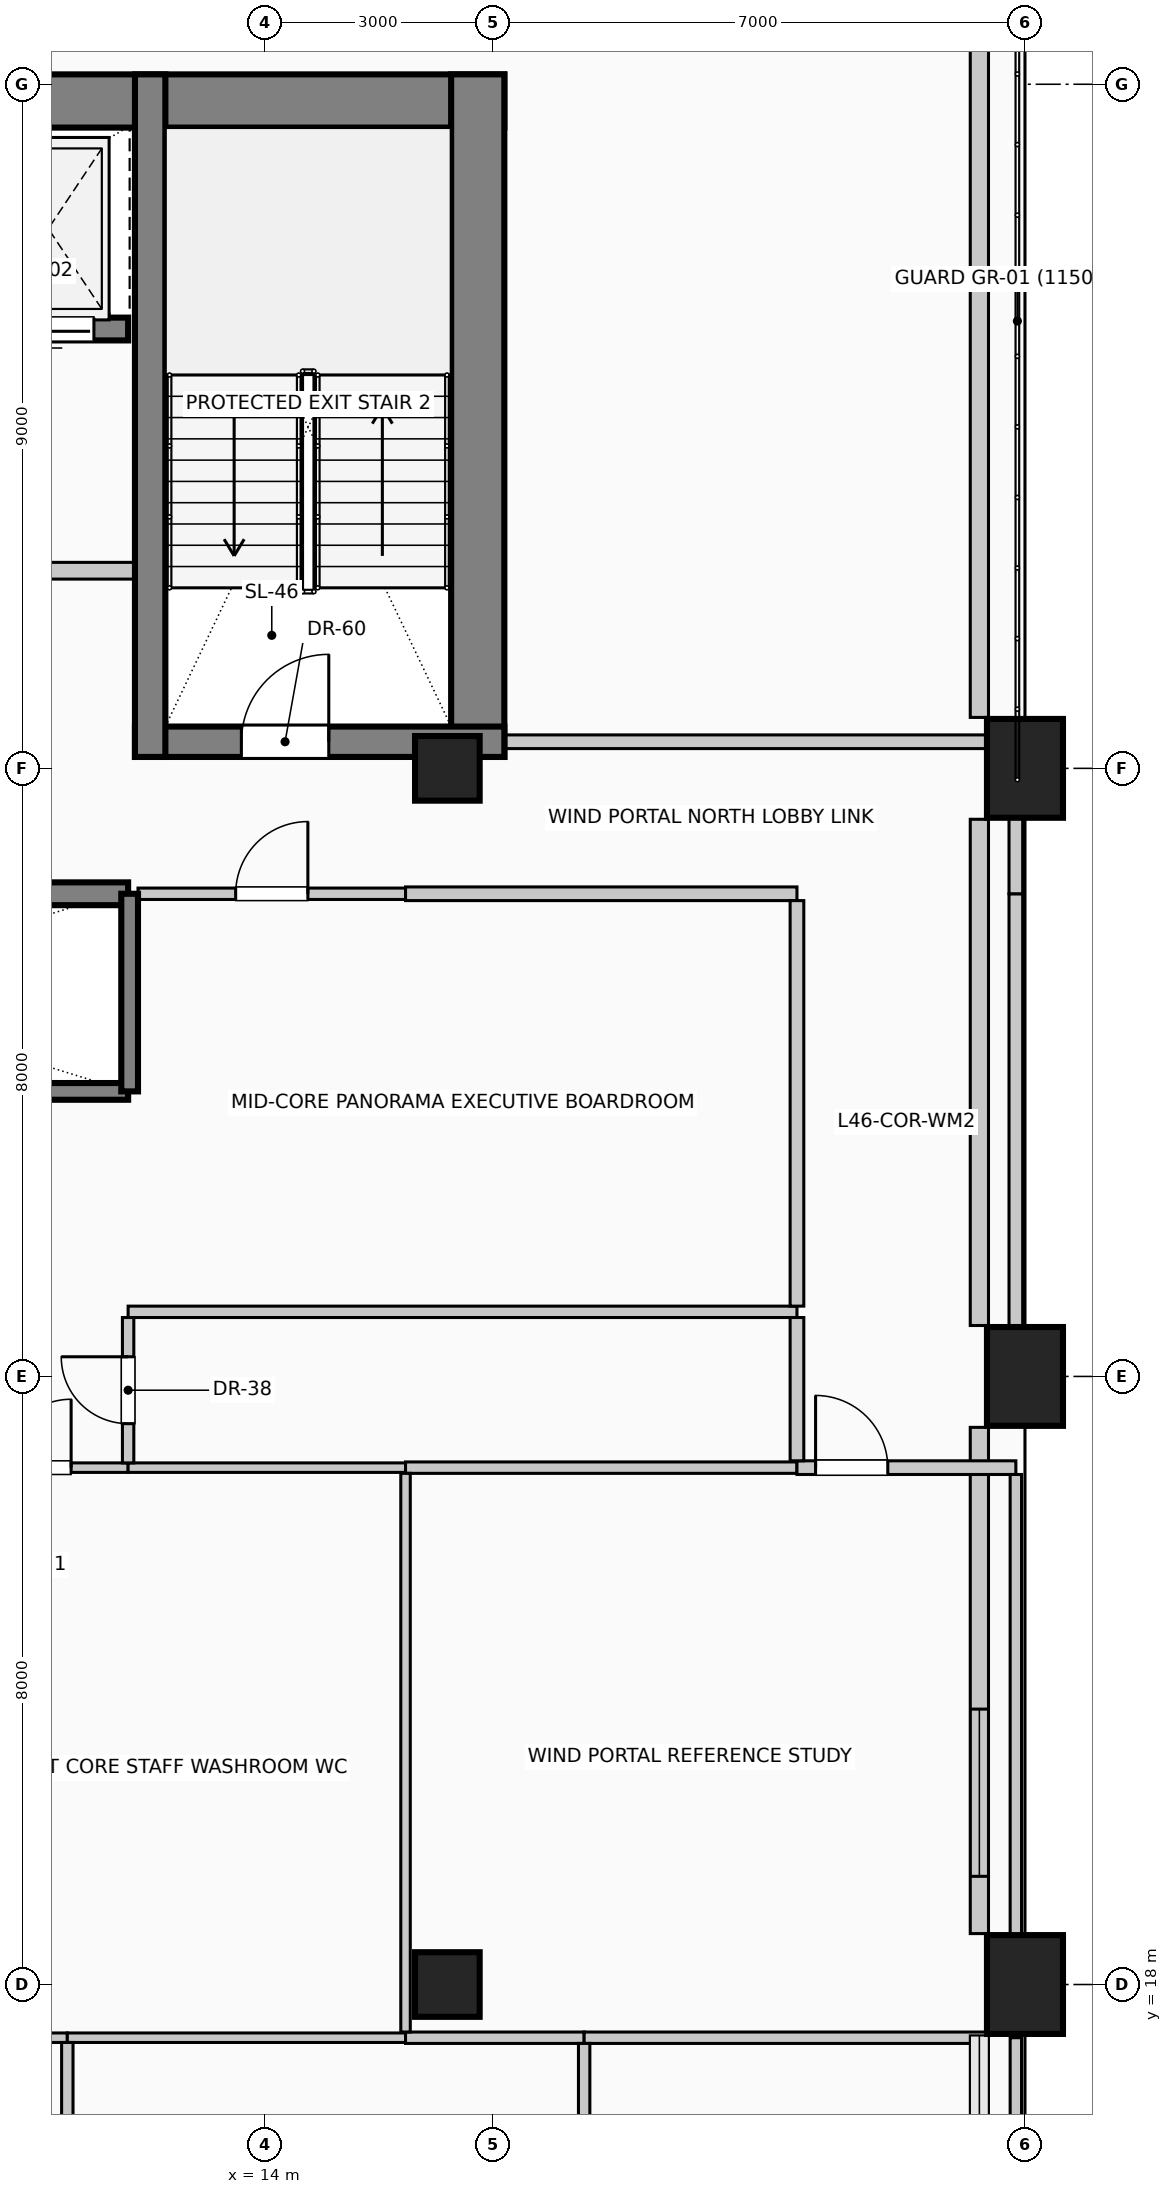
"""IFC4 building model, lengths in metres.
Left out: names, types, materials, properties, quantities, classifications, styles, units other than length and angle.
Written with IfcOpenShell. Run it as: python <this file> out.ifc"""

import sys

from ifc_helpers import new_model, si_unit, direction, frame, frame_2d, origin, origin_2d, place, context, subcontext, project, spatial, rectangle, circle, extrude, element, fill, save


model = new_model("IFC4")
c1 = context("Model", 3, precision=1e-05, world=origin(), true_north=direction((0.0, 1.0)))
c2 = subcontext(c1, "Body", "Model", "MODEL_VIEW")
j1 = project(units=[si_unit("LENGTHUNIT", "METRE"), si_unit("PLANEANGLEUNIT", "RADIAN")], contexts=[c1])
p1 = place(None, origin())
s1 = spatial("IfcSite", under=j1, at=p1, CompositionType="ELEMENT")
p2 = place(p1, origin())
s2 = spatial("IfcBuilding", under=s1, at=p2, CompositionType="ELEMENT")
p3 = place(p2, frame((0.0, 0.0, 190.6)))
s3 = spatial("IfcBuildingStorey", under=s2, at=p3, CompositionType="ELEMENT", Elevation=190.6)
p4 = place(p3, frame((2.85, 42.78, 0.0), z_axis=(0.0, 0.0, 1.0), x_axis=(1.0, 0.0, 0.0)))
e1 = element("IfcWall", 1, at=p4, inside=s3, PredefinedType="SHEAR", context=c2, shape_type="SweptSolid", body=[
    extrude(rectangle(XDim=14.3, YDim=0.7, at=frame_2d((7.15, 0.0))), origin(), (0.0, 0.0, 1.0), 4.0),
])
p5 = place(p3, frame((16.8, 34.15, 0.0), z_axis=(0.0, 0.0, 1.0), x_axis=(0.0, 1.0, 0.0)))
e2 = element("IfcWall", 2, at=p5, inside=s3, PredefinedType="SHEAR", context=c2, shape_type="SweptSolid", body=[
    extrude(rectangle(XDim=8.98, YDim=0.7, at=frame_2d((4.49, 0.0))), origin(), (0.0, 0.0, 1.0), 4.0),
])
p6 = place(p3, frame((12.29, 34.35, 0.0), z_axis=(0.0, 0.0, 1.0), x_axis=(1.0, 0.0, 0.0)))
e3 = element("IfcWall", 3, at=p6, inside=s3, PredefinedType="SHEAR", context=c2, shape_type="SweptSolid", body=[
    extrude(rectangle(XDim=4.86, YDim=0.4, at=frame_2d((2.43, 0.0))), origin(), (0.0, 0.0, 1.0), 4.0),
])
p7 = place(p6, frame((1.4, 0.0, 0.0)))
e4 = element("IfcOpeningElement", 4, at=p7, cuts=e3, PredefinedType="OPENING", context=c2, shape_type="SweptSolid", body=[
    extrude(rectangle(XDim=1.15, YDim=2.2, at=frame_2d((0.575, 1.1))), frame((0.0, 0.21, 0.0), z_axis=(0.0, -1.0, 0.0), x_axis=(1.0, 0.0, 0.0)), (0.0, 0.0, 1.0), 0.42),
])
p8 = place(p3, frame((12.49, 34.15, 0.0), z_axis=(0.0, 0.0, 1.0), x_axis=(0.0, 1.0, 0.0)))
e5 = element("IfcWall", 5, at=p8, inside=s3, PredefinedType="SHEAR", context=c2, shape_type="SweptSolid", body=[
    extrude(rectangle(XDim=8.98, YDim=0.4, at=frame_2d((4.49, 0.0))), origin(), (0.0, 0.0, 1.0), 4.0),
])
for number, where, z_axis, x_axis in (
    (6, (24.0, 18.0, 0.0), (0.0, 0.0, 1.0), (1.0, 0.0, 0.0)),
    (7, (24.0, 26.0, 0.0), (0.0, 0.0, 1.0), (1.0, 0.0, 0.0)),
    (8, (24.0, 34.0, 0.0), (0.0, 0.0, 1.0), (1.0, 0.0, 0.0)),
):
    element("IfcColumn", number, at=place(p3, frame(where, z_axis=z_axis, x_axis=x_axis)), inside=s3, PredefinedType="COLUMN", context=c2, shape_type="SweptSolid", body=[
        extrude(rectangle(XDim=1.0, YDim=1.3, at=origin_2d()), origin(), (0.0, 0.0, 1.0), 4.0),
    ])
for number, where, z_axis, x_axis in (
    (9, (16.4, 18.0, 0.0), (0.0, 0.0, 1.0), (1.0, 0.0, 0.0)),
    (10, (16.4, 34.0, 0.0), (0.0, 0.0, 1.0), (1.0, 0.0, 0.0)),
):
    element("IfcColumn", number, at=place(p3, frame(where, z_axis=z_axis, x_axis=x_axis)), inside=s3, PredefinedType="COLUMN", context=c2, shape_type="SweptSolid", body=[
        extrude(circle(Radius=0.425, at=origin_2d()), origin(), (0.0, 0.0, 1.0), 4.0),
    ])
p9 = place(p3, frame((23.4, 25.33, 0.0), z_axis=(0.0, 0.0, 1.0), x_axis=(0.0, -1.0, 0.0)))
e11 = element("IfcWall", 11, at=p9, inside=s3, PredefinedType="SOLIDWALL", context=c2, shape_type="SweptSolid", body=[
    extrude(rectangle(XDim=6.66, YDim=0.24, at=frame_2d((3.33, 0.0))), origin(), (0.0, 0.0, 1.0), 3.75),
])
p10 = place(p9, frame((3.707, 0.0, 0.42)))
e12 = element("IfcOpeningElement", 12, at=p10, cuts=e11, PredefinedType="OPENING", context=c2, shape_type="SweptSolid", body=[
    extrude(rectangle(XDim=2.2, YDim=1.95, at=frame_2d((1.1, 0.975))), frame((0.0, 0.13, 0.0), z_axis=(0.0, -1.0, 0.0), x_axis=(1.0, 0.0, 0.0)), (0.0, 0.0, 1.0), 0.26),
])
p11 = place(p3, frame((23.4, 33.33, 0.0), z_axis=(0.0, 0.0, 1.0), x_axis=(0.0, -1.0, 0.0)))
e13 = element("IfcWall", 13, at=p11, inside=s3, PredefinedType="SOLIDWALL", context=c2, shape_type="SweptSolid", body=[
    extrude(rectangle(XDim=6.66, YDim=0.24, at=frame_2d((3.33, 0.0))), origin(), (0.0, 0.0, 1.0), 3.75),
])
p12 = place(p3, frame((23.4, 44.73, 0.0), z_axis=(0.0, 0.0, 1.0), x_axis=(0.0, -1.0, 0.0)))
e14 = element("IfcWall", 14, at=p12, inside=s3, PredefinedType="SOLIDWALL", context=c2, shape_type="SweptSolid", body=[
    extrude(rectangle(XDim=10.06, YDim=0.24, at=frame_2d((5.03, 0.0))), origin(), (0.0, 0.0, 1.0), 3.75),
])
p13 = place(p3, frame((10.05, 32.35, 0.0), z_axis=(0.0, 0.0, 1.0), x_axis=(1.0, 0.0, 0.0)))
e15 = element("IfcWall", 15, at=p13, inside=s3, PredefinedType="SOLIDWALL", context=c2, shape_type="SweptSolid", body=[
    extrude(rectangle(XDim=2.15, YDim=0.3, at=frame_2d((1.075, 0.0))), origin(), (0.0, 0.0, 1.0), 4.0),
])
p14 = place(p3, frame((12.2, 39.78, 0.0), z_axis=(0.0, 0.0, 1.0), x_axis=(-1.0, 0.0, 0.0)))
e16 = element("IfcWall", 16, at=p14, inside=s3, PredefinedType="SOLIDWALL", context=c2, shape_type="SweptSolid", body=[
    extrude(rectangle(XDim=2.2, YDim=0.3, at=frame_2d((1.1, 0.0))), origin(), (0.0, 0.0, 1.0), 4.0),
])
p15 = place(p14, frame((0.45, 0.0, 0.0)))
e17 = element("IfcOpeningElement", 17, at=p15, cuts=e16, PredefinedType="OPENING", context=c2, shape_type="SweptSolid", body=[
    extrude(rectangle(XDim=1.3, YDim=2.25, at=frame_2d((0.65, 1.125))), frame((0.0, 0.16, 0.0), z_axis=(0.0, -1.0, 0.0), x_axis=(1.0, 0.0, 0.0)), (0.0, 0.0, 1.0), 0.32),
])
p16 = place(p3, frame((3.55, 29.75, 0.0), z_axis=(0.0, 0.0, 1.0), x_axis=(1.0, 0.0, 0.0)))
e18 = element("IfcWall", 18, at=p16, inside=s3, PredefinedType="SOLIDWALL", context=c2, shape_type="SweptSolid", body=[
    extrude(rectangle(XDim=8.65, YDim=0.22, at=frame_2d((4.325, 0.0))), origin(), (0.0, 0.0, 1.0), 4.0),
])
p17 = place(p3, frame((12.22, 29.75, 0.0), z_axis=(0.0, 0.0, 1.0), x_axis=(0.0, 1.0, 0.0)))
e19 = element("IfcWall", 19, at=p17, inside=s3, PredefinedType="SOLIDWALL", context=c2, shape_type="SweptSolid", body=[
    extrude(rectangle(XDim=2.6, YDim=0.22, at=frame_2d((1.3, 0.0))), origin(), (0.0, 0.0, 1.0), 4.0),
])
p18 = place(p3, frame((7.51, 36.6, 0.0), z_axis=(0.0, 0.0, 1.0), x_axis=(1.0, 0.0, 0.0)))
e20 = element("IfcWall", 20, at=p18, inside=s3, PredefinedType="PARTITIONING", context=c2, shape_type="SweptSolid", body=[
    extrude(rectangle(XDim=4.98, YDim=0.22, at=frame_2d((2.49, 0.0))), origin(), (0.0, 0.0, 1.0), 3.75),
])
p19 = place(p18, frame((1.94, 0.0, 0.0)))
e21 = element("IfcOpeningElement", 21, at=p19, cuts=e20, PredefinedType="OPENING", context=c2, shape_type="SweptSolid", body=[
    extrude(rectangle(XDim=1.1, YDim=2.2, at=frame_2d((0.55, 1.1))), frame((0.0, 0.12, 0.0), z_axis=(0.0, -1.0, 0.0), x_axis=(1.0, 0.0, 0.0)), (0.0, 0.0, 1.0), 0.24),
])
p20 = place(p3, frame((9.8, 17.3, 0.0), z_axis=(0.0, 0.0, 1.0), x_axis=(1.0, 0.0, 0.0)))
e22 = element("IfcWall", 22, at=p20, inside=s3, PredefinedType="PARTITIONING", context=c2, shape_type="SweptSolid", body=[
    extrude(rectangle(XDim=1.6, YDim=0.125, at=frame_2d((0.8, 0.0))), origin(), (0.0, 0.0, 1.0), 3.75),
])
p21 = place(p3, frame((11.4, 17.3, 0.0), z_axis=(0.0, 0.0, 1.0), x_axis=(1.0, 0.0, 0.0)))
e23 = element("IfcWall", 23, at=p21, inside=s3, PredefinedType="PARTITIONING", context=c2, shape_type="SweptSolid", body=[
    extrude(rectangle(XDim=4.45, YDim=0.125, at=frame_2d((2.225, 0.0))), origin(), (0.0, 0.0, 1.0), 3.75),
])
p22 = place(p3, frame((15.85, 17.3, 0.0), z_axis=(0.0, 0.0, 1.0), x_axis=(1.0, 0.0, 0.0)))
e24 = element("IfcWall", 24, at=p22, inside=s3, PredefinedType="PARTITIONING", context=c2, shape_type="SweptSolid", body=[
    extrude(rectangle(XDim=2.35, YDim=0.15, at=frame_2d((1.175, 0.0))), origin(), (0.0, 0.0, 1.0), 3.75),
])
p23 = place(p3, frame((18.2, 17.3, 0.0), z_axis=(0.0, 0.0, 1.0), x_axis=(1.0, 0.0, 0.0)))
e25 = element("IfcWall", 25, at=p23, inside=s3, PredefinedType="PARTITIONING", context=c2, shape_type="SweptSolid", body=[
    extrude(rectangle(XDim=5.3, YDim=0.15, at=frame_2d((2.65, 0.0))), origin(), (0.0, 0.0, 1.0), 3.75),
])
p24 = place(p3, frame((9.8, 24.8, 0.0), z_axis=(0.0, 0.0, 1.0), x_axis=(1.0, 0.0, 0.0)))
e26 = element("IfcWall", 26, at=p24, inside=s3, PredefinedType="PARTITIONING", context=c2, shape_type="SweptSolid", body=[
    extrude(rectangle(XDim=2.4, YDim=0.125, at=frame_2d((1.2, 0.0))), origin(), (0.0, 0.0, 1.0), 3.75),
])
p25 = place(p24, frame((0.75, 0.0, 0.0)))
e27 = element("IfcOpeningElement", 27, at=p25, cuts=e26, PredefinedType="OPENING", context=c2, shape_type="SweptSolid", body=[
    extrude(rectangle(XDim=0.9, YDim=2.1, at=frame_2d((0.45, 1.05))), frame((0.0, 0.073, 0.0), z_axis=(0.0, -1.0, 0.0), x_axis=(1.0, 0.0, 0.0)), (0.0, 0.0, 1.0), 0.145),
])
p26 = place(p3, frame((12.2, 24.8, 0.0), z_axis=(0.0, 0.0, 1.0), x_axis=(1.0, 0.0, 0.0)))
e28 = element("IfcWall", 28, at=p26, inside=s3, PredefinedType="PARTITIONING", context=c2, shape_type="SweptSolid", body=[
    extrude(rectangle(XDim=3.65, YDim=0.125, at=frame_2d((1.825, 0.0))), origin(), (0.0, 0.0, 1.0), 3.75),
])
p27 = place(p3, frame((15.85, 24.8, 0.0), z_axis=(0.0, 0.0, 1.0), x_axis=(1.0, 0.0, 0.0)))
e29 = element("IfcWall", 29, at=p27, inside=s3, PredefinedType="PARTITIONING", context=c2, shape_type="SweptSolid", body=[
    extrude(rectangle(XDim=5.15, YDim=0.15, at=frame_2d((2.575, 0.0))), origin(), (0.0, 0.0, 1.0), 3.75),
])
p28 = place(p3, frame((21.0, 24.8, 0.0), z_axis=(0.0, 0.0, 1.0), x_axis=(1.0, 0.0, 0.0)))
e30 = element("IfcWall", 30, at=p28, inside=s3, PredefinedType="PARTITIONING", context=c2, shape_type="SweptSolid", body=[
    extrude(rectangle(XDim=2.88, YDim=0.18, at=frame_2d((1.44, 0.0))), origin(), (0.0, 0.0, 1.0), 3.75),
])
p29 = place(p28, frame((0.245, 0.0, 0.0)))
e31 = element("IfcOpeningElement", 31, at=p29, cuts=e30, PredefinedType="OPENING", context=c2, shape_type="SweptSolid", body=[
    extrude(rectangle(XDim=0.95, YDim=2.15, at=frame_2d((0.475, 1.075))), frame((0.0, 0.1, 0.0), z_axis=(0.0, -1.0, 0.0), x_axis=(1.0, 0.0, 0.0)), (0.0, 0.0, 1.0), 0.2),
])
p30 = place(p3, frame((12.2, 26.85, 0.0), z_axis=(0.0, 0.0, 1.0), x_axis=(1.0, 0.0, 0.0)))
e32 = element("IfcWall", 32, at=p30, inside=s3, PredefinedType="PARTITIONING", context=c2, shape_type="SweptSolid", body=[
    extrude(rectangle(XDim=8.8, YDim=0.15, at=frame_2d((4.4, 0.0))), origin(), (0.0, 0.0, 1.0), 3.75),
])
p31 = place(p3, frame((12.33, 32.35, 0.0), z_axis=(0.0, 0.0, 1.0), x_axis=(1.0, 0.0, 0.0)))
e33 = element("IfcWall", 33, at=p31, inside=s3, PredefinedType="PARTITIONING", context=c2, shape_type="SweptSolid", body=[
    extrude(rectangle(XDim=3.52, YDim=0.15, at=frame_2d((1.76, 0.0))), origin(), (0.0, 0.0, 1.0), 3.75),
])
p32 = place(p31, frame((1.285, 0.0, 0.0)))
e34 = element("IfcOpeningElement", 34, at=p32, cuts=e33, PredefinedType="OPENING", context=c2, shape_type="SweptSolid", body=[
    extrude(rectangle(XDim=0.95, YDim=2.15, at=frame_2d((0.475, 1.075))), frame((0.0, 0.085, 0.0), z_axis=(0.0, -1.0, 0.0), x_axis=(1.0, 0.0, 0.0)), (0.0, 0.0, 1.0), 0.17),
])
p33 = place(p3, frame((15.85, 32.35, 0.0), z_axis=(0.0, 0.0, 1.0), x_axis=(1.0, 0.0, 0.0)))
e35 = element("IfcWall", 35, at=p33, inside=s3, PredefinedType="PARTITIONING", context=c2, shape_type="SweptSolid", body=[
    extrude(rectangle(XDim=5.15, YDim=0.18, at=frame_2d((2.575, 0.0))), origin(), (0.0, 0.0, 1.0), 3.75),
])
p34 = place(p3, frame((17.15, 34.35, 0.0), z_axis=(0.0, 0.0, 1.0), x_axis=(1.0, 0.0, 0.0)))
e36 = element("IfcWall", 36, at=p34, inside=s3, PredefinedType="PARTITIONING", context=c2, shape_type="SweptSolid", body=[
    extrude(rectangle(XDim=6.35, YDim=0.18, at=frame_2d((3.175, 0.0))), origin(), (0.0, 0.0, 1.0), 3.75),
])
p35 = place(p3, frame((11.4, 10.39, 0.0), z_axis=(0.0, 0.0, 1.0), x_axis=(0.0, 1.0, 0.0)))
e37 = element("IfcWall", 37, at=p35, inside=s3, PredefinedType="PARTITIONING", context=c2, shape_type="SweptSolid", body=[
    extrude(rectangle(XDim=6.848, YDim=0.15, at=frame_2d((3.424, 0.0))), origin(), (0.0, 0.0, 1.0), 3.75),
])
p36 = place(p3, frame((12.2, 24.863, 0.0), z_axis=(0.0, 0.0, 1.0), x_axis=(0.0, 1.0, 0.0)))
e38 = element("IfcWall", 38, at=p36, inside=s3, PredefinedType="PARTITIONING", context=c2, shape_type="SweptSolid", body=[
    extrude(rectangle(XDim=1.912, YDim=0.15, at=frame_2d((0.956, 0.0))), origin(), (0.0, 0.0, 1.0), 3.75),
])
p37 = place(p36, frame((0.516, 0.0, 0.0)))
e39 = element("IfcOpeningElement", 39, at=p37, cuts=e38, PredefinedType="OPENING", context=c2, shape_type="SweptSolid", body=[
    extrude(rectangle(XDim=0.88, YDim=2.1, at=frame_2d((0.44, 1.05))), frame((0.0, 0.085, 0.0), z_axis=(0.0, -1.0, 0.0), x_axis=(1.0, 0.0, 0.0)), (0.0, 0.0, 1.0), 0.17),
])
p38 = place(p3, frame((15.85, 17.375, 0.0), z_axis=(0.0, 0.0, 1.0), x_axis=(0.0, 1.0, 0.0)))
e40 = element("IfcWall", 40, at=p38, inside=s3, PredefinedType="PARTITIONING", context=c2, shape_type="SweptSolid", body=[
    extrude(rectangle(XDim=7.35, YDim=0.125, at=frame_2d((3.675, 0.0))), origin(), (0.0, 0.0, 1.0), 3.75),
])
p39 = place(p3, frame((18.2, 10.39, 0.0), z_axis=(0.0, 0.0, 1.0), x_axis=(0.0, 1.0, 0.0)))
e41 = element("IfcWall", 41, at=p39, inside=s3, PredefinedType="PARTITIONING", context=c2, shape_type="SweptSolid", body=[
    extrude(rectangle(XDim=6.835, YDim=0.15, at=frame_2d((3.417, 0.0))), origin(), (0.0, 0.0, 1.0), 3.75),
])
p40 = place(p3, frame((21.0, 24.89, 0.0), z_axis=(0.0, 0.0, 1.0), x_axis=(0.0, 1.0, 0.0)))
e42 = element("IfcWall", 42, at=p40, inside=s3, PredefinedType="PARTITIONING", context=c2, shape_type="SweptSolid", body=[
    extrude(rectangle(XDim=1.885, YDim=0.18, at=frame_2d((0.942, 0.0))), origin(), (0.0, 0.0, 1.0), 3.75),
])
p41 = place(p3, frame((21.0, 26.925, 0.0), z_axis=(0.0, 0.0, 1.0), x_axis=(0.0, 1.0, 0.0)))
e43 = element("IfcWall", 43, at=p41, inside=s3, PredefinedType="PARTITIONING", context=c2, shape_type="SweptSolid", body=[
    extrude(rectangle(XDim=5.335, YDim=0.18, at=frame_2d((2.667, 0.0))), origin(), (0.0, 0.0, 1.0), 3.75),
])
p42 = place(p3, frame((23.88, 10.65, 0.0), z_axis=(0.0, 0.0, 1.0), x_axis=(0.0, 1.0, 0.0)))
e44 = element("IfcWall", 44, at=p42, inside=s3, PredefinedType="PARTITIONING", context=c2, shape_type="SweptSolid", body=[
    extrude(rectangle(XDim=6.65, YDim=0.15, at=frame_2d((3.325, 0.0))), origin(), (0.0, 0.0, 1.0), 3.145),
])
p43 = place(p3, frame((23.88, 18.65, 0.0), z_axis=(0.0, 0.0, 1.0), x_axis=(0.0, 1.0, 0.0)))
e45 = element("IfcWall", 45, at=p43, inside=s3, PredefinedType="PARTITIONING", context=c2, shape_type="SweptSolid", body=[
    extrude(rectangle(XDim=6.06, YDim=0.15, at=frame_2d((3.03, 0.0))), origin(), (0.0, 0.0, 1.0), 3.145),
])
p44 = place(p3, frame((23.88, 26.65, 0.0), z_axis=(0.0, 0.0, 1.0), x_axis=(0.0, 1.0, 0.0)))
e46 = element("IfcWall", 46, at=p44, inside=s3, PredefinedType="PARTITIONING", context=c2, shape_type="SweptSolid", body=[
    extrude(rectangle(XDim=5.7, YDim=0.18, at=frame_2d((2.85, 0.0))), origin(), (0.0, 0.0, 1.0), 3.145),
])
p45 = place(p3, frame((23.88, 32.35, 0.0), z_axis=(0.0, 0.0, 1.0), x_axis=(0.0, 1.0, 0.0)))
e47 = element("IfcWall", 47, at=p45, inside=s3, PredefinedType="PARTITIONING", context=c2, shape_type="SweptSolid", body=[
    extrude(rectangle(XDim=1.0, YDim=0.18, at=frame_2d((0.5, 0.0))), origin(), (0.0, 0.0, 1.0), 3.145),
])
p46 = place(p10, origin())
e48 = element("IfcWindow", 48, at=p46, inside=s3, PartitioningType="SINGLE_PANEL", PredefinedType="WINDOW", context=c2, shape_type="SweptSolid", body=[
    extrude(rectangle(XDim=2.2, YDim=1.95, at=frame_2d((1.1, 0.975))), frame((0.0, 0.03, 0.0), z_axis=(0.0, -1.0, 0.0), x_axis=(1.0, 0.0, 0.0)), (0.0, 0.0, 1.0), 0.06),
])
fill(e12, e48)
p47 = place(p15, origin())
e49 = element("IfcDoor", 49, at=p47, inside=s3, OperationType="SLIDING_TO_RIGHT", PredefinedType="DOOR", context=c2, shape_type="SweptSolid", body=[
    extrude(rectangle(XDim=1.3, YDim=2.25, at=frame_2d((0.65, 1.125))), frame((0.0, 0.025, 0.0), z_axis=(0.0, -1.0, 0.0), x_axis=(1.0, 0.0, 0.0)), (0.0, 0.0, 1.0), 0.05),
])
fill(e17, e49)
p48 = place(p7, origin())
e50 = element("IfcDoor", 50, at=p48, inside=s3, OperationType="SINGLE_SWING_RIGHT", PredefinedType="DOOR", context=c2, shape_type="SweptSolid", body=[
    extrude(rectangle(XDim=1.15, YDim=2.2, at=frame_2d((0.575, 1.1))), frame((0.0, 0.025, 0.0), z_axis=(0.0, -1.0, 0.0), x_axis=(1.0, 0.0, 0.0)), (0.0, 0.0, 1.0), 0.05),
])
fill(e4, e50)
p49 = place(p25, origin())
e51 = element("IfcDoor", 51, at=p49, inside=s3, OperationType="SINGLE_SWING_RIGHT", PredefinedType="DOOR", context=c2, shape_type="SweptSolid", body=[
    extrude(rectangle(XDim=0.9, YDim=2.1, at=frame_2d((0.45, 1.05))), frame((0.0, 0.025, 0.0), z_axis=(0.0, -1.0, 0.0), x_axis=(1.0, 0.0, 0.0)), (0.0, 0.0, 1.0), 0.05),
])
fill(e27, e51)
p50 = place(p29, origin())
e52 = element("IfcDoor", 52, at=p50, inside=s3, OperationType="SINGLE_SWING_LEFT", PredefinedType="DOOR", context=c2, shape_type="SweptSolid", body=[
    extrude(rectangle(XDim=0.95, YDim=2.15, at=frame_2d((0.475, 1.075))), frame((0.0, 0.025, 0.0), z_axis=(0.0, -1.0, 0.0), x_axis=(1.0, 0.0, 0.0)), (0.0, 0.0, 1.0), 0.05),
])
fill(e31, e52)
p51 = place(p32, origin())
e53 = element("IfcDoor", 53, at=p51, inside=s3, OperationType="SINGLE_SWING_RIGHT", PredefinedType="DOOR", context=c2, shape_type="SweptSolid", body=[
    extrude(rectangle(XDim=0.95, YDim=2.15, at=frame_2d((0.475, 1.075))), frame((0.0, 0.025, 0.0), z_axis=(0.0, -1.0, 0.0), x_axis=(1.0, 0.0, 0.0)), (0.0, 0.0, 1.0), 0.05),
])
fill(e34, e53)
p52 = place(p37, origin())
e54 = element("IfcDoor", 54, at=p52, inside=s3, OperationType="SINGLE_SWING_RIGHT", PredefinedType="DOOR", context=c2, shape_type="SweptSolid", body=[
    extrude(rectangle(XDim=0.88, YDim=2.1, at=frame_2d((0.44, 1.05))), frame((0.0, 0.025, 0.0), z_axis=(0.0, -1.0, 0.0), x_axis=(1.0, 0.0, 0.0)), (0.0, 0.0, 1.0), 0.05),
])
fill(e39, e54)
save(model, sys.argv[1])
